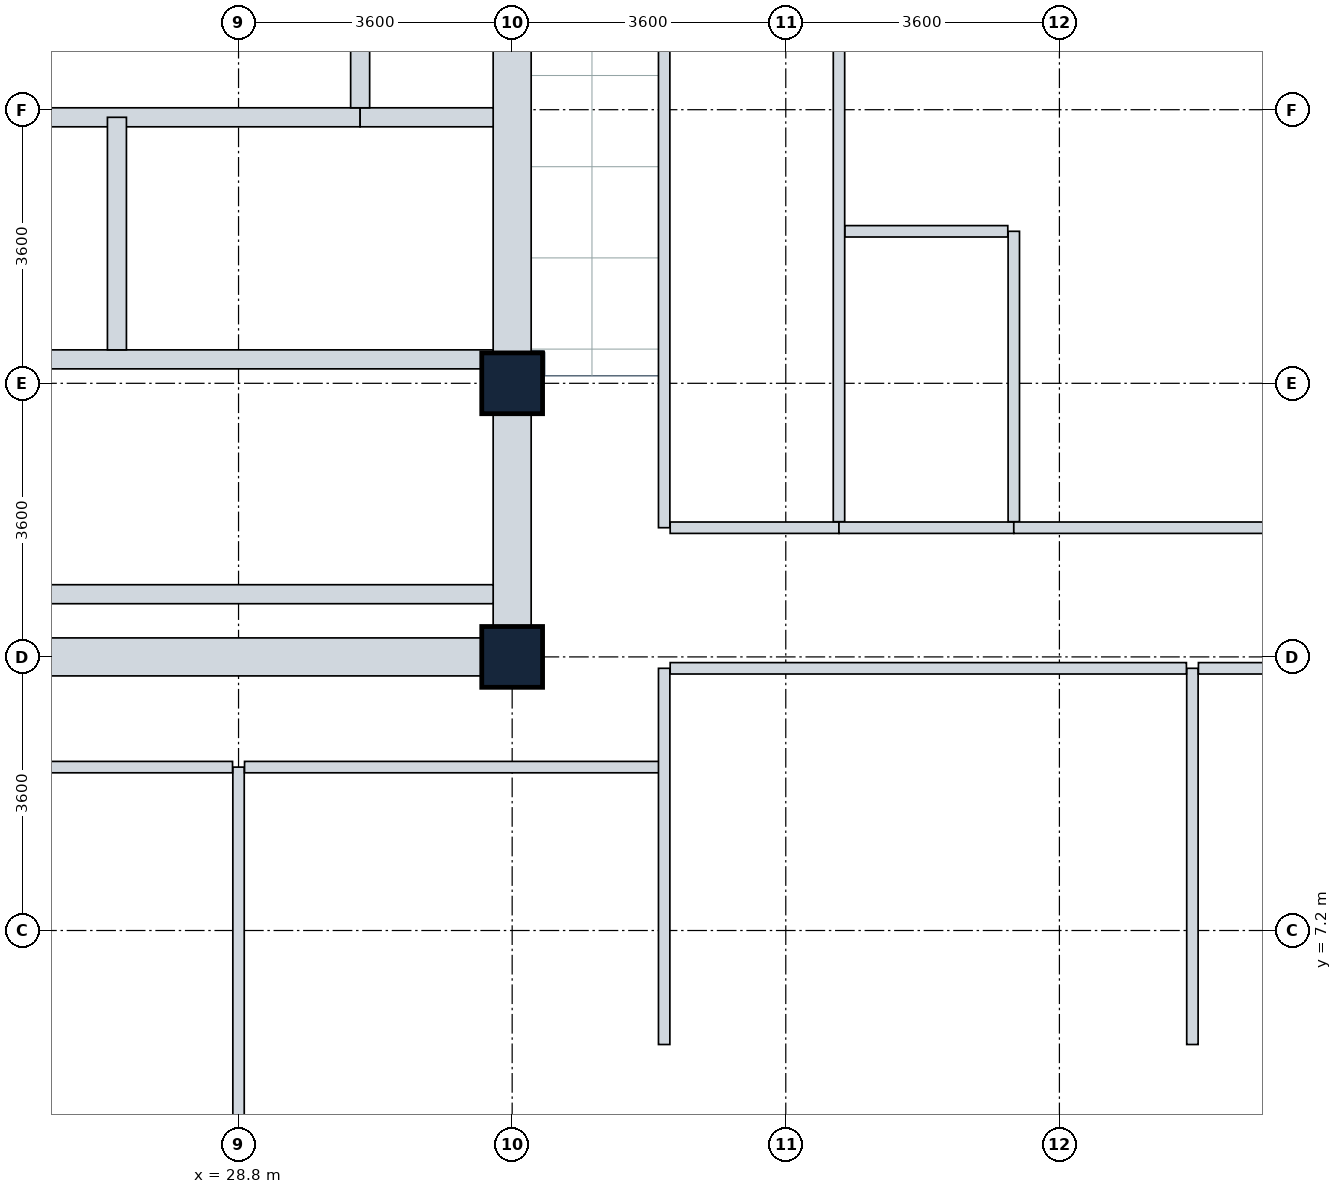
"""IFC4 building model, lengths in metres.
Left out: names, types, materials, properties, quantities, classifications, styles, units other than length and angle.
Written with IfcOpenShell. Run it as: python <this file> out.ifc"""

import sys

from ifc_helpers import new_model, si_unit, direction, frame, frame_2d, origin, origin_2d, place, context, subcontext, project, spatial, rectangle, extrude, element, fill, save


model = new_model("IFC4")
c1 = context("Model", 3, precision=1e-05, world=origin(), true_north=direction((0.0, 1.0)))
c2 = subcontext(c1, "Body", "Model", "MODEL_VIEW")
j1 = project(units=[si_unit("LENGTHUNIT", "METRE"), si_unit("PLANEANGLEUNIT", "RADIAN")], contexts=[c1])
p1 = place(None, origin())
s1 = spatial("IfcSite", under=j1, at=p1, CompositionType="ELEMENT")
p2 = place(p1, origin())
s2 = spatial("IfcBuilding", under=s1, at=p2, CompositionType="ELEMENT")
p3 = place(p2, frame((0.0, 0.0, 209.0)))
s3 = spatial("IfcBuildingStorey", under=s2, at=p3, CompositionType="ELEMENT", Elevation=209.0)
for number, where, z_axis, x_axis in (
    (1, (32.4, 10.8, 0.0), (0.0, 0.0, 1.0), (1.0, 0.0, 0.0)),
    (2, (32.4, 14.4, 0.0), (0.0, 0.0, 1.0), (1.0, 0.0, 0.0)),
):
    element("IfcColumn", number, at=place(p3, frame(where, z_axis=z_axis, x_axis=x_axis)), inside=s3, PredefinedType="COLUMN", context=c2, shape_type="SweptSolid", body=[
        extrude(rectangle(XDim=0.8, YDim=0.8, at=origin_2d()), origin(), (0.0, 0.0, 1.0), 4.8),
    ])
p4 = place(p3, frame((14.4, 10.8, 0.0), z_axis=(0.0, 0.0, 1.0), x_axis=(1.0, 0.0, 0.0)))
e3 = element("IfcWall", 3, at=p4, inside=s3, PredefinedType="SHEAR", context=c2, shape_type="SweptSolid", body=[
    extrude(rectangle(XDim=18.0, YDim=0.5, at=frame_2d((9.0, 0.0))), origin(), (0.0, 0.0, 1.0), 4.55),
])
p5 = place(p3, frame((32.4, 10.8, 0.0), z_axis=(0.0, 0.0, 1.0), x_axis=(0.0, 1.0, 0.0)))
e4 = element("IfcWall", 4, at=p5, inside=s3, PredefinedType="SHEAR", context=c2, shape_type="SweptSolid", body=[
    extrude(rectangle(XDim=14.4, YDim=0.5, at=frame_2d((7.2, 0.0))), origin(), (0.0, 0.0, 1.0), 4.55),
])
p6 = place(p5, frame((4.35, 0.0, 0.0)))
e5 = element("IfcOpeningElement", 5, at=p6, cuts=e4, PredefinedType="OPENING", context=c2, shape_type="SweptSolid", body=[
    extrude(rectangle(XDim=1.2, YDim=2.1, at=frame_2d((0.6, 1.05))), frame((0.0, 0.26, 0.0), z_axis=(0.0, -1.0, 0.0), x_axis=(1.0, 0.0, 0.0)), (0.0, 0.0, 1.0), 0.52),
])
p7 = place(p5, frame((10.0, 0.0, 0.0)))
e6 = element("IfcOpeningElement", 6, at=p7, cuts=e4, PredefinedType="OPENING", context=c2, shape_type="SweptSolid", body=[
    extrude(rectangle(XDim=1.2, YDim=2.1, at=frame_2d((0.6, 1.05))), frame((0.0, 0.26, 0.0), z_axis=(0.0, -1.0, 0.0), x_axis=(1.0, 0.0, 0.0)), (0.0, 0.0, 1.0), 0.52),
])
p8 = place(p3, frame((23.35, 11.625, 0.0), z_axis=(0.0, 0.0, 1.0), x_axis=(1.0, 0.0, 0.0)))
e7 = element("IfcWall", 7, at=p8, inside=s3, PredefinedType="SHEAR", context=c2, shape_type="SweptSolid", body=[
    extrude(rectangle(XDim=8.8, YDim=0.25, at=frame_2d((4.4, 0.0))), origin(), (0.0, 0.0, 1.0), 4.55),
])
p9 = place(p3, frame((23.35, 14.715, 0.0), z_axis=(0.0, 0.0, 1.0), x_axis=(1.0, 0.0, 0.0)))
e8 = element("IfcWall", 8, at=p9, inside=s3, PredefinedType="SHEAR", context=c2, shape_type="SweptSolid", body=[
    extrude(rectangle(XDim=8.8, YDim=0.25, at=frame_2d((4.4, 0.0))), origin(), (0.0, 0.0, 1.0), 4.55),
])
p10 = place(p9, frame((6.775, 0.0, 0.0)))
e9 = element("IfcOpeningElement", 9, at=p10, cuts=e8, PredefinedType="OPENING", context=c2, shape_type="SweptSolid", body=[
    extrude(rectangle(XDim=1.1, YDim=2.1, at=frame_2d((0.55, 1.05))), frame((0.0, 0.135, 0.0), z_axis=(0.0, -1.0, 0.0), x_axis=(1.0, 0.0, 0.0)), (0.0, 0.0, 1.0), 0.27),
])
p11 = place(p3, frame((21.88, 17.9, 0.0), z_axis=(0.0, 0.0, 1.0), x_axis=(1.0, 0.0, 0.0)))
e10 = element("IfcWall", 10, at=p11, inside=s3, PredefinedType="PARTITIONING", context=c2, shape_type="SweptSolid", body=[
    extrude(rectangle(XDim=8.52, YDim=0.25, at=frame_2d((4.26, 0.0))), origin(), (0.0, 0.0, 1.0), 4.535),
])
p12 = place(p3, frame((30.4, 17.9, 0.0), z_axis=(0.0, 0.0, 1.0), x_axis=(1.0, 0.0, 0.0)))
e11 = element("IfcWall", 11, at=p12, inside=s3, PredefinedType="PARTITIONING", context=c2, shape_type="SweptSolid", body=[
    extrude(rectangle(XDim=1.75, YDim=0.25, at=frame_2d((0.875, 0.0))), origin(), (0.0, 0.0, 1.0), 4.535),
])
p13 = place(p12, frame((0.32, 0.0, 0.0)))
e12 = element("IfcOpeningElement", 12, at=p13, cuts=e11, PredefinedType="OPENING", context=c2, shape_type="SweptSolid", body=[
    extrude(rectangle(XDim=1.1, YDim=2.1, at=frame_2d((0.55, 1.05))), frame((0.0, 0.135, 0.0), z_axis=(0.0, -1.0, 0.0), x_axis=(1.0, 0.0, 0.0)), (0.0, 0.0, 1.0), 0.27),
])
p14 = place(p3, frame((27.2, 14.84, 0.0), z_axis=(0.0, 0.0, 1.0), x_axis=(0.0, 1.0, 0.0)))
e13 = element("IfcWall", 13, at=p14, inside=s3, PredefinedType="PARTITIONING", context=c2, shape_type="SweptSolid", body=[
    extrude(rectangle(XDim=3.06, YDim=0.25, at=frame_2d((1.53, 0.0))), origin(), (0.0, 0.0, 1.0), 4.535),
])
p15 = place(p14, frame((0.98, 0.0, 0.0)))
e14 = element("IfcOpeningElement", 14, at=p15, cuts=e13, PredefinedType="OPENING", context=c2, shape_type="SweptSolid", body=[
    extrude(rectangle(XDim=1.1, YDim=2.1, at=frame_2d((0.55, 1.05))), frame((0.0, 0.135, 0.0), z_axis=(0.0, -1.0, 0.0), x_axis=(1.0, 0.0, 0.0)), (0.0, 0.0, 1.0), 0.27),
])
p16 = place(p3, frame((30.4, 18.025, 0.0), z_axis=(0.0, 0.0, 1.0), x_axis=(0.0, 1.0, 0.0)))
e15 = element("IfcWall", 15, at=p16, inside=s3, PredefinedType="PARTITIONING", context=c2, shape_type="SweptSolid", body=[
    extrude(rectangle(XDim=2.27, YDim=0.25, at=frame_2d((1.135, 0.0))), origin(), (0.0, 0.0, 1.0), 4.535),
])
p17 = place(p3, frame((34.4, 12.5, 0.0), z_axis=(0.0, 0.0, 1.0), x_axis=(0.0, 1.0, 0.0)))
e16 = element("IfcWall", 16, at=p17, inside=s3, PredefinedType="PARTITIONING", context=c2, shape_type="SweptSolid", body=[
    extrude(rectangle(XDim=12.7, YDim=0.15, at=frame_2d((6.35, 0.0))), origin(), (0.0, 0.0, 1.0), 3.93),
])
p18 = place(p3, frame((34.479, 12.5, 0.0), z_axis=(0.0, 0.0, 1.0), x_axis=(1.0, 0.0, 0.0)))
e17 = element("IfcWall", 17, at=p18, inside=s3, PredefinedType="PARTITIONING", context=c2, shape_type="SweptSolid", body=[
    extrude(rectangle(XDim=2.221, YDim=0.15, at=frame_2d((1.11, 0.0))), origin(), (0.0, 0.0, 1.0), 4.26),
])
p19 = place(p18, frame((0.674, 0.0, 0.0)))
e18 = element("IfcOpeningElement", 18, at=p19, cuts=e17, PredefinedType="OPENING", context=c2, shape_type="SweptSolid", body=[
    extrude(rectangle(XDim=0.85, YDim=2.1, at=frame_2d((0.425, 1.05))), frame((0.0, 0.085, 0.0), z_axis=(0.0, -1.0, 0.0), x_axis=(1.0, 0.0, 0.0)), (0.0, 0.0, 1.0), 0.17),
])
p20 = place(p3, frame((36.7, 12.579, 0.0), z_axis=(0.0, 0.0, 1.0), x_axis=(0.0, 1.0, 0.0)))
e19 = element("IfcWall", 19, at=p20, inside=s3, PredefinedType="PARTITIONING", context=c2, shape_type="SweptSolid", body=[
    extrude(rectangle(XDim=12.492, YDim=0.15, at=frame_2d((6.246, 0.0))), origin(), (0.0, 0.0, 1.0), 3.93),
])
p21 = place(p3, frame((36.7, 12.5, 0.0), z_axis=(0.0, 0.0, 1.0), x_axis=(1.0, 0.0, 0.0)))
e20 = element("IfcWall", 20, at=p21, inside=s3, PredefinedType="PARTITIONING", context=c2, shape_type="SweptSolid", body=[
    extrude(rectangle(XDim=2.3, YDim=0.15, at=frame_2d((1.15, 0.0))), origin(), (0.0, 0.0, 1.0), 4.535),
])
p22 = place(p21, frame((0.697, 0.0, 0.0)))
e21 = element("IfcOpeningElement", 21, at=p22, cuts=e20, PredefinedType="OPENING", context=c2, shape_type="SweptSolid", body=[
    extrude(rectangle(XDim=0.85, YDim=2.1, at=frame_2d((0.425, 1.05))), frame((0.0, 0.085, 0.0), z_axis=(0.0, -1.0, 0.0), x_axis=(1.0, 0.0, 0.0)), (0.0, 0.0, 1.0), 0.17),
])
p23 = place(p3, frame((39.0, 12.579, 0.0), z_axis=(0.0, 0.0, 1.0), x_axis=(0.0, 1.0, 0.0)))
e22 = element("IfcWall", 22, at=p23, inside=s3, PredefinedType="PARTITIONING", context=c2, shape_type="SweptSolid", body=[
    extrude(rectangle(XDim=3.821, YDim=0.15, at=frame_2d((1.91, 0.0))), origin(), (0.0, 0.0, 1.0), 4.23),
])
p24 = place(p3, frame((36.779, 16.4, 0.0), z_axis=(0.0, 0.0, 1.0), x_axis=(1.0, 0.0, 0.0)))
e23 = element("IfcWall", 23, at=p24, inside=s3, PredefinedType="PARTITIONING", context=c2, shape_type="SweptSolid", body=[
    extrude(rectangle(XDim=2.142, YDim=0.15, at=frame_2d((1.071, 0.0))), origin(), (0.0, 0.0, 1.0), 4.535),
])
p25 = place(p3, frame((28.8, 9.35, 0.0), z_axis=(0.0, 0.0, 1.0), x_axis=(0.0, -1.0, 0.0)))
e24 = element("IfcWall", 24, at=p25, inside=s3, PredefinedType="PARTITIONING", context=c2, shape_type="SweptSolid", body=[
    extrude(rectangle(XDim=5.621, YDim=0.15, at=frame_2d((2.811, 0.0))), origin(), (0.0, 0.0, 1.0), 4.535),
])
p26 = place(p3, frame((13.08, 9.35, 0.0), z_axis=(0.0, 0.0, 1.0), x_axis=(1.0, 0.0, 0.0)))
e25 = element("IfcWall", 25, at=p26, inside=s3, PredefinedType="PARTITIONING", context=c2, shape_type="SweptSolid", body=[
    extrude(rectangle(XDim=15.641, YDim=0.15, at=frame_2d((7.82, 0.0))), origin(), (0.0, 0.0, 1.0), 4.22),
])
p27 = place(p26, frame((4.706, 0.0, 0.0)))
e26 = element("IfcOpeningElement", 26, at=p27, cuts=e25, PredefinedType="OPENING", context=c2, shape_type="SweptSolid", body=[
    extrude(rectangle(XDim=1.0, YDim=2.1, at=frame_2d((0.5, 1.05))), frame((0.0, 0.085, 0.0), z_axis=(0.0, -1.0, 0.0), x_axis=(1.0, 0.0, 0.0)), (0.0, 0.0, 1.0), 0.17),
])
p28 = place(p3, frame((28.879, 9.35, 0.0), z_axis=(0.0, 0.0, 1.0), x_axis=(1.0, 0.0, 0.0)))
e27 = element("IfcWall", 27, at=p28, inside=s3, PredefinedType="PARTITIONING", context=c2, shape_type="SweptSolid", body=[
    extrude(rectangle(XDim=5.521, YDim=0.15, at=frame_2d((2.76, 0.0))), origin(), (0.0, 0.0, 1.0), 4.535),
])
p29 = place(p28, frame((0.36, 0.0, 0.0)))
e28 = element("IfcOpeningElement", 28, at=p29, cuts=e27, PredefinedType="OPENING", context=c2, shape_type="SweptSolid", body=[
    extrude(rectangle(XDim=1.0, YDim=2.1, at=frame_2d((0.5, 1.05))), frame((0.0, 0.085, 0.0), z_axis=(0.0, -1.0, 0.0), x_axis=(1.0, 0.0, 0.0)), (0.0, 0.0, 1.0), 0.17),
])
p30 = place(p3, frame((34.4, 5.7, 0.0), z_axis=(0.0, 0.0, 1.0), x_axis=(0.0, 1.0, 0.0)))
e29 = element("IfcWall", 29, at=p30, inside=s3, PredefinedType="PARTITIONING", context=c2, shape_type="SweptSolid", body=[
    extrude(rectangle(XDim=4.95, YDim=0.15, at=frame_2d((2.475, 0.0))), origin(), (0.0, 0.0, 1.0), 4.535),
])
p31 = place(p3, frame((41.35, 5.7, 0.0), z_axis=(0.0, 0.0, 1.0), x_axis=(0.0, 1.0, 0.0)))
e30 = element("IfcWall", 30, at=p31, inside=s3, PredefinedType="PARTITIONING", context=c2, shape_type="SweptSolid", body=[
    extrude(rectangle(XDim=4.95, YDim=0.15, at=frame_2d((2.475, 0.0))), origin(), (0.0, 0.0, 1.0), 4.2),
])
p32 = place(p3, frame((34.479, 10.65, 0.0), z_axis=(0.0, 0.0, 1.0), x_axis=(1.0, 0.0, 0.0)))
e31 = element("IfcWall", 31, at=p32, inside=s3, PredefinedType="PARTITIONING", context=c2, shape_type="SweptSolid", body=[
    extrude(rectangle(XDim=6.792, YDim=0.15, at=frame_2d((3.396, 0.0))), origin(), (0.0, 0.0, 1.0), 4.17),
])
p33 = place(p32, frame((2.896, 0.0, 0.0)))
e32 = element("IfcOpeningElement", 32, at=p33, cuts=e31, PredefinedType="OPENING", context=c2, shape_type="SweptSolid", body=[
    extrude(rectangle(XDim=1.0, YDim=2.1, at=frame_2d((0.5, 1.05))), frame((0.0, 0.085, 0.0), z_axis=(0.0, -1.0, 0.0), x_axis=(1.0, 0.0, 0.0)), (0.0, 0.0, 1.0), 0.17),
])
p34 = place(p3, frame((41.429, 10.65, 0.0), z_axis=(0.0, 0.0, 1.0), x_axis=(1.0, 0.0, 0.0)))
e33 = element("IfcWall", 33, at=p34, inside=s3, PredefinedType="PARTITIONING", context=c2, shape_type="SweptSolid", body=[
    extrude(rectangle(XDim=8.842, YDim=0.15, at=frame_2d((4.421, 0.0))), origin(), (0.0, 0.0, 1.0), 3.93),
])
p35 = place(p34, frame((3.946, 0.0, 0.0)))
e34 = element("IfcOpeningElement", 34, at=p35, cuts=e33, PredefinedType="OPENING", context=c2, shape_type="SweptSolid", body=[
    extrude(rectangle(XDim=1.0, YDim=2.1, at=frame_2d((0.5, 1.05))), frame((0.0, 0.085, 0.0), z_axis=(0.0, -1.0, 0.0), x_axis=(1.0, 0.0, 0.0)), (0.0, 0.0, 1.0), 0.17),
])
p36 = place(p3, frame((39.0, 12.5, 0.0), z_axis=(0.0, 0.0, 1.0), x_axis=(1.0, 0.0, 0.0)))
e35 = element("IfcWall", 35, at=p36, inside=s3, PredefinedType="PARTITIONING", context=c2, shape_type="SweptSolid", body=[
    extrude(rectangle(XDim=5.971, YDim=0.15, at=frame_2d((2.985, 0.0))), origin(), (0.0, 0.0, 1.0), 4.22),
])
p37 = place(p36, frame((0.675, 0.0, 0.0)))
e36 = element("IfcOpeningElement", 36, at=p37, cuts=e35, PredefinedType="OPENING", context=c2, shape_type="SweptSolid", body=[
    extrude(rectangle(XDim=1.0, YDim=2.1, at=frame_2d((0.5, 1.05))), frame((0.0, 0.085, 0.0), z_axis=(0.0, -1.0, 0.0), x_axis=(1.0, 0.0, 0.0)), (0.0, 0.0, 1.0), 0.17),
])
p38 = place(p10, origin())
e37 = element("IfcDoor", 37, at=p38, inside=s3, OperationType="SINGLE_SWING_LEFT", PredefinedType="DOOR", context=c2, shape_type="SweptSolid", body=[
    extrude(rectangle(XDim=1.1, YDim=2.1, at=frame_2d((0.55, 1.05))), frame((0.0, 0.025, 0.0), z_axis=(0.0, -1.0, 0.0), x_axis=(1.0, 0.0, 0.0)), (0.0, 0.0, 1.0), 0.05),
])
fill(e9, e37)
p39 = place(p15, origin())
e38 = element("IfcDoor", 38, at=p39, inside=s3, OperationType="SLIDING_TO_LEFT", PredefinedType="DOOR", context=c2, shape_type="SweptSolid", body=[
    extrude(rectangle(XDim=1.1, YDim=2.1, at=frame_2d((0.55, 1.05))), frame((0.0, 0.025, 0.0), z_axis=(0.0, -1.0, 0.0), x_axis=(1.0, 0.0, 0.0)), (0.0, 0.0, 1.0), 0.05),
])
fill(e14, e38)
p40 = place(p6, origin())
e39 = element("IfcDoor", 39, at=p40, inside=s3, OperationType="SINGLE_SWING_LEFT", PredefinedType="DOOR", context=c2, shape_type="SweptSolid", body=[
    extrude(rectangle(XDim=1.2, YDim=2.1, at=frame_2d((0.6, 1.05))), frame((0.0, 0.025, 0.0), z_axis=(0.0, -1.0, 0.0), x_axis=(1.0, 0.0, 0.0)), (0.0, 0.0, 1.0), 0.05),
])
fill(e5, e39)
p41 = place(p13, origin())
e40 = element("IfcDoor", 40, at=p41, inside=s3, OperationType="SINGLE_SWING_LEFT", PredefinedType="DOOR", context=c2, shape_type="SweptSolid", body=[
    extrude(rectangle(XDim=1.1, YDim=2.1, at=frame_2d((0.55, 1.05))), frame((0.0, 0.025, 0.0), z_axis=(0.0, -1.0, 0.0), x_axis=(1.0, 0.0, 0.0)), (0.0, 0.0, 1.0), 0.05),
])
fill(e12, e40)
p42 = place(p19, origin())
e41 = element("IfcDoor", 41, at=p42, inside=s3, OperationType="SINGLE_SWING_RIGHT", PredefinedType="DOOR", context=c2, shape_type="SweptSolid", body=[
    extrude(rectangle(XDim=0.85, YDim=2.1, at=frame_2d((0.425, 1.05))), frame((0.0, 0.025, 0.0), z_axis=(0.0, -1.0, 0.0), x_axis=(1.0, 0.0, 0.0)), (0.0, 0.0, 1.0), 0.05),
])
fill(e18, e41)
p43 = place(p22, origin())
e42 = element("IfcDoor", 42, at=p43, inside=s3, OperationType="SINGLE_SWING_RIGHT", PredefinedType="DOOR", context=c2, shape_type="SweptSolid", body=[
    extrude(rectangle(XDim=0.85, YDim=2.1, at=frame_2d((0.425, 1.05))), frame((0.0, 0.025, 0.0), z_axis=(0.0, -1.0, 0.0), x_axis=(1.0, 0.0, 0.0)), (0.0, 0.0, 1.0), 0.05),
])
fill(e21, e42)
p44 = place(p29, origin())
e43 = element("IfcDoor", 43, at=p44, inside=s3, OperationType="SINGLE_SWING_LEFT", PredefinedType="DOOR", context=c2, shape_type="SweptSolid", body=[
    extrude(rectangle(XDim=1.0, YDim=2.1, at=frame_2d((0.5, 1.05))), frame((0.0, 0.025, 0.0), z_axis=(0.0, -1.0, 0.0), x_axis=(1.0, 0.0, 0.0)), (0.0, 0.0, 1.0), 0.05),
])
fill(e28, e43)
p45 = place(p33, origin())
e44 = element("IfcDoor", 44, at=p45, inside=s3, OperationType="SINGLE_SWING_RIGHT", PredefinedType="DOOR", context=c2, shape_type="SweptSolid", body=[
    extrude(rectangle(XDim=1.0, YDim=2.1, at=frame_2d((0.5, 1.05))), frame((0.0, 0.025, 0.0), z_axis=(0.0, -1.0, 0.0), x_axis=(1.0, 0.0, 0.0)), (0.0, 0.0, 1.0), 0.05),
])
fill(e32, e44)
p46 = place(p37, origin())
e45 = element("IfcDoor", 45, at=p46, inside=s3, OperationType="SINGLE_SWING_RIGHT", PredefinedType="DOOR", context=c2, shape_type="SweptSolid", body=[
    extrude(rectangle(XDim=1.0, YDim=2.1, at=frame_2d((0.5, 1.05))), frame((0.0, 0.025, 0.0), z_axis=(0.0, -1.0, 0.0), x_axis=(1.0, 0.0, 0.0)), (0.0, 0.0, 1.0), 0.05),
])
fill(e36, e45)
save(model, sys.argv[1])
